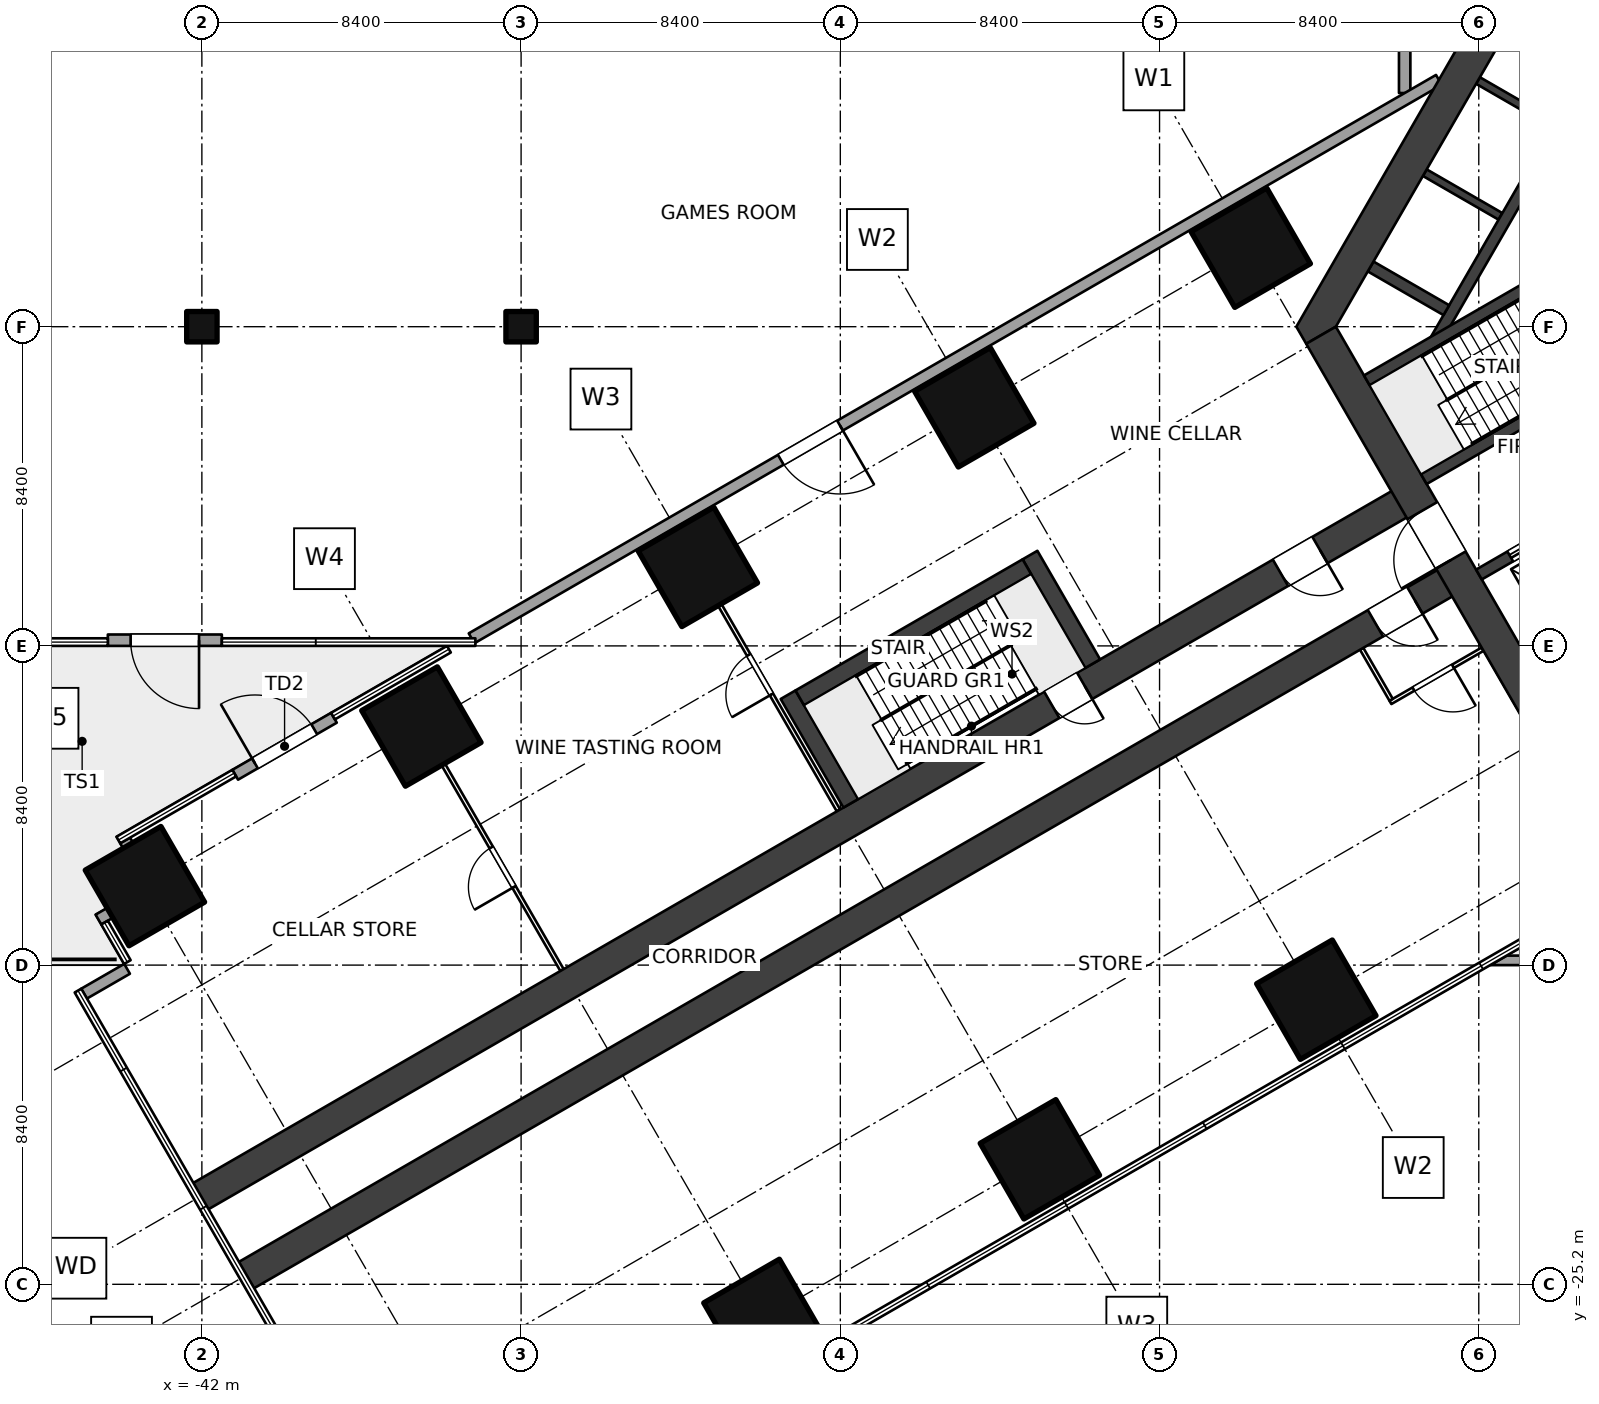
"""IFC4 building model, lengths in metres.
Left out: names, types, materials, properties, quantities, classifications, styles, units other than length and angle.
Written with IfcOpenShell. Run it as: python <this file> out.ifc"""

import sys

from ifc_helpers import new_model, si_unit, direction, frame, frame_2d, origin, origin_2d, place, context, subcontext, project, spatial, polyline, rectangle, outline, extrude, element, fill, save


model = new_model("IFC4")
c1 = context("Model", 3, precision=1e-05, world=origin(), true_north=direction((0.0, 1.0)))
c2 = subcontext(c1, "Body", "Model", "MODEL_VIEW")
j1 = project(units=[si_unit("LENGTHUNIT", "METRE"), si_unit("PLANEANGLEUNIT", "RADIAN")], contexts=[c1])
p1 = place(None, origin())
s1 = spatial("IfcSite", under=j1, at=p1, CompositionType="ELEMENT")
p2 = place(p1, origin())
s2 = spatial("IfcBuilding", under=s1, at=p2, CompositionType="ELEMENT")
p3 = place(p2, frame((0.0, 0.0, 21.0)))
s3 = spatial("IfcBuildingStorey", under=s2, at=p3, CompositionType="ELEMENT", Elevation=21.0)
for number, where, z_axis, x_axis in (
    (1, (-14.4, 2.078, 0.0), (0.0, 0.0, 1.0), (-0.5, 0.866, 0.0)),
    (2, (-12.675, -17.71, 0.0), (0.0, 0.0, 1.0), (-0.5, 0.866, 0.0)),
    (3, (-21.675, -2.122, 0.0), (0.0, 0.0, 1.0), (-0.5, 0.866, 0.0)),
    (4, (-19.949, -21.91, 0.0), (0.0, 0.0, 1.0), (-0.5, 0.866, 0.0)),
    (5, (-28.949, -6.322, 0.0), (0.0, 0.0, 1.0), (-0.5, 0.866, 0.0)),
    (6, (-27.224, -26.11, 0.0), (0.0, 0.0, 1.0), (-0.5, 0.866, 0.0)),
    (7, (-36.224, -10.521, 0.0), (0.0, 0.0, 1.0), (-0.5, 0.866, 0.0)),
    (8, (-43.499, -14.721, 0.0), (0.0, 0.0, 1.0), (-0.5, 0.866, 0.0)),
):
    element("IfcColumn", number, at=place(p3, frame(where, z_axis=z_axis, x_axis=x_axis)), inside=s3, PredefinedType="COLUMN", context=c2, shape_type="SweptSolid", body=[
        extrude(rectangle(XDim=2.3, YDim=2.3, at=origin_2d()), origin(), (0.0, 0.0, 1.0), 5.0),
    ])
for number, where, z_axis, x_axis in (
    (9, (-42.0, 0.0, 0.0), (0.0, 0.0, 1.0), (1.0, 0.0, 0.0)),
    (10, (-33.6, 0.0, 0.0), (0.0, 0.0, 1.0), (1.0, 0.0, 0.0)),
):
    element("IfcColumn", number, at=place(p3, frame(where, z_axis=z_axis, x_axis=x_axis)), inside=s3, PredefinedType="COLUMN", context=c2, shape_type="SweptSolid", body=[
        extrude(rectangle(XDim=0.8, YDim=0.8, at=origin_2d()), origin(), (0.0, 0.0, 1.0), 5.0),
    ])
p4 = place(p3, frame((-6.47, -10.757, 0.0), z_axis=(0.0, 0.0, 1.0), x_axis=(-0.499997612506, 0.8660267822, 0.0)))
e11 = element("IfcWall", 11, at=p4, inside=s3, PredefinedType="SHEAR", context=c2, shape_type="SweptSolid", body=[
    extrude(rectangle(XDim=12.161, YDim=0.9, at=frame_2d((6.08, 0.0))), origin(), (0.0, 0.0, 1.0), 5.0),
])
p5 = place(p4, frame((5.33, 0.0, 0.0)))
e12 = element("IfcOpeningElement", 12, at=p5, cuts=e11, PredefinedType="OPENING", context=c2, shape_type="SweptSolid", body=[
    extrude(rectangle(XDim=1.5, YDim=2.1, at=frame_2d((0.75, 1.05))), frame((0.0, 0.46, 0.0), z_axis=(0.0, -1.0, 0.0), x_axis=(1.0, 0.0, 0.0)), (0.0, 0.0, 1.0), 0.92),
])
p6 = place(p3, origin())
e13 = element("IfcWall", 13, at=p6, inside=s3, PredefinedType="SHEAR", context=c2, shape_type="SweptSolid", body=[
    extrude(outline(polyline([(-6.6, 11.432), (-13.2, 0.0), (-12.94, -0.45), (-12.161, 0.0), (-6.08, 10.531), (-6.08, 11.432), (-6.6, 11.432)])), origin(), (0.0, 0.0, 1.0), 5.0),
])
p7 = place(p3, frame((-3.869, -0.559, 0.0), z_axis=(0.0, 0.0, 1.0), x_axis=(-0.86602711848, -0.499997030048, 0.0)))
e14 = element("IfcWall", 14, at=p7, inside=s3, PredefinedType="SHEAR", context=c2, shape_type="SweptSolid", body=[
    extrude(rectangle(XDim=6.901, YDim=0.3, at=frame_2d((3.451, 0.0))), origin(), (0.0, 0.0, 1.0), 5.0),
])
p8 = place(p7, frame((0.25, 0.0, 0.0)))
e15 = element("IfcOpeningElement", 15, at=p8, cuts=e14, PredefinedType="OPENING", context=c2, shape_type="SweptSolid", body=[
    extrude(rectangle(XDim=1.0, YDim=2.1, at=frame_2d((0.5, 1.05))), frame((0.0, 0.16, 0.0), z_axis=(0.0, -1.0, 0.0), x_axis=(1.0, 0.0, 0.0)), (0.0, 0.0, 1.0), 0.32),
])
p9 = place(p3, frame((-5.369, 2.039, 0.0), z_axis=(0.0, 0.0, 1.0), x_axis=(-0.86602711848, -0.499997030048, 0.0)))
e16 = element("IfcWall", 16, at=p9, inside=s3, PredefinedType="SHEAR", context=c2, shape_type="SweptSolid", body=[
    extrude(rectangle(XDim=6.901, YDim=0.3, at=frame_2d((3.451, 0.0))), origin(), (0.0, 0.0, 1.0), 5.0),
])
p10 = place(p3, frame((-2.419, -3.071, 0.0), z_axis=(0.0, 0.0, 1.0), x_axis=(-0.86602711848, -0.499997030048, 0.0)))
e17 = element("IfcWall", 17, at=p10, inside=s3, PredefinedType="SHEAR", context=c2, shape_type="SweptSolid", body=[
    extrude(rectangle(XDim=6.901, YDim=0.3, at=frame_2d((3.451, 0.0))), origin(), (0.0, 0.0, 1.0), 5.0),
])
p11 = place(p10, frame((4.85, 0.0, 0.0)))
e18 = element("IfcOpeningElement", 18, at=p11, cuts=e17, PredefinedType="OPENING", context=c2, shape_type="SweptSolid", body=[
    extrude(rectangle(XDim=1.1, YDim=2.1, at=frame_2d((0.55, 1.05))), frame((0.0, 0.16, 0.0), z_axis=(0.0, -1.0, 0.0), x_axis=(1.0, 0.0, 0.0)), (0.0, 0.0, 1.0), 0.32),
])
p12 = place(p3, frame((-9.548, -0.374, 0.0), z_axis=(0.0, 0.0, 1.0), x_axis=(0.500002290144, 0.866024081565, 0.0)))
e19 = element("IfcWall", 19, at=p12, inside=s3, PredefinedType="SHEAR", context=c2, shape_type="SweptSolid", body=[
    extrude(rectangle(XDim=10.195, YDim=0.3, at=frame_2d((5.098, 0.0))), origin(), (0.0, 0.0, 1.0), 5.0),
])
p13 = place(p3, frame((-9.254, 0.435, 0.0), z_axis=(0.0, 0.0, 1.0), x_axis=(-0.866007057882, 0.500031774688, 0.0)))
e20 = element("IfcWall", 20, at=p13, inside=s3, PredefinedType="SHEAR", context=c2, shape_type="SweptSolid", body=[
    extrude(rectangle(XDim=2.3, YDim=0.3, at=frame_2d((1.15, 0.0))), origin(), (0.0, 0.0, 1.0), 5.0),
])
for number, where, z_axis, x_axis in (
    (21, (-7.829, 2.903, 0.0), (0.0, 0.0, 1.0), (-0.866, 0.5, 0.0)),
    (22, (-6.429, 5.328, 0.0), (0.0, 0.0, 1.0), (-0.866, 0.5, 0.0)),
):
    element("IfcWall", number, at=place(p3, frame(where, z_axis=z_axis, x_axis=x_axis)), inside=s3, PredefinedType="SHEAR", context=c2, shape_type="SweptSolid", body=[
        extrude(rectangle(XDim=2.3, YDim=0.2, at=frame_2d((1.15, 0.0))), origin(), (0.0, 0.0, 1.0), 5.0),
    ])
p14 = place(p3, frame((-8.91, -6.53, 0.0), z_axis=(0.0, 0.0, 1.0), x_axis=(-0.866026214035, -0.499998596603, 0.0)))
e23 = element("IfcWall", 23, at=p14, inside=s3, PredefinedType="SHEAR", context=c2, shape_type="SweptSolid", body=[
    extrude(rectangle(XDim=36.888, YDim=0.8, at=frame_2d((18.444, 0.0))), origin(), (0.0, 0.0, 1.0), 5.0),
])
p15 = place(p14, frame((1.35, 0.0, 0.0)))
e24 = element("IfcOpeningElement", 24, at=p15, cuts=e23, PredefinedType="OPENING", context=c2, shape_type="SweptSolid", body=[
    extrude(rectangle(XDim=1.2, YDim=2.1, at=frame_2d((0.6, 1.05))), frame((0.0, 0.41, 0.0), z_axis=(0.0, -1.0, 0.0), x_axis=(1.0, 0.0, 0.0)), (0.0, 0.0, 1.0), 0.82),
])
p16 = place(p3, frame((-10.11, -4.451, 0.0), z_axis=(0.0, 0.0, 1.0), x_axis=(-0.866023348156, -0.500003560437, 0.0)))
e25 = element("IfcWall", 25, at=p16, inside=s3, PredefinedType="SHEAR", context=c2, shape_type="SweptSolid", body=[
    extrude(rectangle(XDim=36.888, YDim=0.8, at=frame_2d((18.444, 0.0))), origin(), (0.0, 0.0, 1.0), 5.0),
])
p17 = place(p16, frame((10.0, 0.0, 0.0)))
e26 = element("IfcOpeningElement", 26, at=p17, cuts=e25, PredefinedType="OPENING", context=c2, shape_type="SweptSolid", body=[
    extrude(rectangle(XDim=1.0, YDim=2.1, at=frame_2d((0.5, 1.05))), frame((0.0, 0.41, 0.0), z_axis=(0.0, -1.0, 0.0), x_axis=(1.0, 0.0, 0.0)), (0.0, 0.0, 1.0), 0.82),
])
p18 = place(p16, frame((2.85, 0.0, 0.0)))
e27 = element("IfcOpeningElement", 27, at=p18, cuts=e25, PredefinedType="OPENING", context=c2, shape_type="SweptSolid", body=[
    extrude(rectangle(XDim=1.2, YDim=2.1, at=frame_2d((0.6, 1.05))), frame((0.0, 0.41, 0.0), z_axis=(0.0, -1.0, 0.0), x_axis=(1.0, 0.0, 0.0)), (0.0, 0.0, 1.0), 0.82),
])
p19 = place(p3, frame((-45.103, -17.553, 0.0), z_axis=(0.0, 0.0, 1.0), x_axis=(0.865974499684, 0.500088158126, 0.0)))
e28 = element("IfcWall", 28, at=p19, inside=s3, PredefinedType="SOLIDWALL", context=c2, shape_type="SweptSolid", body=[
    extrude(rectangle(XDim=1.31, YDim=0.3, at=frame_2d((0.655, 0.0))), origin(), (0.0, 0.0, 1.0), 4.6),
])
p20 = place(p3, frame((-44.722, -15.602, 0.0), z_axis=(0.0, 0.0, 1.0), x_axis=(0.865939549016, 0.500148675346, 0.0)))
e29 = element("IfcWall", 29, at=p20, inside=s3, PredefinedType="SOLIDWALL", context=c2, shape_type="SweptSolid", body=[
    extrude(rectangle(XDim=0.347, YDim=0.3, at=frame_2d((0.174, 0.0))), origin(), (0.0, 0.0, 1.0), 4.6),
])
p21 = place(p3, frame((-43.519, -14.387, 0.0), z_axis=(0.0, 0.0, 1.0), x_axis=(-0.499953773667, 0.866052090925, 0.0)))
e30 = element("IfcWall", 30, at=p21, inside=s3, PredefinedType="SOLIDWALL", context=c2, shape_type="SweptSolid", body=[
    extrude(rectangle(XDim=1.005, YDim=0.3, at=frame_2d((0.502, 0.0))), origin(), (0.0, 0.0, 1.0), 4.6),
])
p22 = place(p3, frame((-41.123, -11.791, 0.0), z_axis=(0.0, 0.0, 1.0), x_axis=(0.866010750942, 0.50002537861, 0.0)))
e31 = element("IfcWall", 31, at=p22, inside=s3, PredefinedType="SOLIDWALL", context=c2, shape_type="SweptSolid", body=[
    extrude(rectangle(XDim=3.0, YDim=0.3, at=frame_2d((1.5, 0.0))), origin(), (0.0, 0.0, 1.0), 4.6),
])
p23 = place(p22, frame((0.6, 0.0, 0.0)))
e32 = element("IfcOpeningElement", 32, at=p23, cuts=e31, PredefinedType="OPENING", context=c2, shape_type="SweptSolid", body=[
    extrude(rectangle(XDim=1.8, YDim=2.4, at=frame_2d((0.9, 1.2))), frame((0.0, 0.16, 0.0), z_axis=(0.0, -1.0, 0.0), x_axis=(1.0, 0.0, 0.0)), (0.0, 0.0, 1.0), 0.32),
])
p24 = place(p3, frame((-41.475, -8.25, 0.0), z_axis=(0.0, 0.0, 1.0), x_axis=(-1.0, 0.0, 0.0)))
e33 = element("IfcWall", 33, at=p24, inside=s3, PredefinedType="SOLIDWALL", context=c2, shape_type="SweptSolid", body=[
    extrude(rectangle(XDim=3.0, YDim=0.3, at=frame_2d((1.5, 0.0))), origin(), (0.0, 0.0, 1.0), 4.6),
])
p25 = place(p24, frame((0.6, 0.0, 0.0)))
e34 = element("IfcOpeningElement", 34, at=p25, cuts=e33, PredefinedType="OPENING", context=c2, shape_type="SweptSolid", body=[
    extrude(rectangle(XDim=1.8, YDim=2.4, at=frame_2d((0.9, 1.2))), frame((0.0, 0.16, 0.0), z_axis=(0.0, -1.0, 0.0), x_axis=(1.0, 0.0, 0.0)), (0.0, 0.0, 1.0), 0.32),
])
p26 = place(p3, origin())
e35 = element("IfcWall", 35, at=p26, inside=s3, PredefinedType="PARAPET", context=c2, shape_type="SweptSolid", body=[
    extrude(outline(polyline([(8.096, -16.8), (-8.096, -16.8), (-7.663, -16.55), (7.663, -16.55), (8.096, -16.8)])), origin(), (0.0, 0.0, 1.0), 1.1),
])
p27 = place(p3, frame((-8.3, -8.487, 0.0), z_axis=(0.0, 0.0, 1.0), x_axis=(-0.866034573852, -0.49998411664, 0.0)))
e36 = element("IfcWall", 36, at=p27, inside=s3, PredefinedType="PARTITIONING", context=c2, shape_type="SweptSolid", body=[
    extrude(rectangle(XDim=2.8, YDim=0.1, at=frame_2d((1.4, 0.0))), origin(), (0.0, 0.0, 1.0), 4.6),
])
p28 = place(p27, frame((0.9, 0.0, 0.0)))
e37 = element("IfcOpeningElement", 37, at=p28, cuts=e36, PredefinedType="OPENING", context=c2, shape_type="SweptSolid", body=[
    extrude(rectangle(XDim=1.2, YDim=2.1, at=frame_2d((0.6, 1.05))), frame((0.0, 0.06, 0.0), z_axis=(0.0, -1.0, 0.0), x_axis=(1.0, 0.0, 0.0)), (0.0, 0.0, 1.0), 0.12),
])
p29 = place(p3, frame((-11.482, -8.476, 0.0), z_axis=(0.0, 0.0, 1.0), x_axis=(0.500017819788, -0.86601511528, 0.0)))
e38 = element("IfcWall", 38, at=p29, inside=s3, PredefinedType="PARTITIONING", context=c2, shape_type="SweptSolid", body=[
    extrude(rectangle(XDim=1.55, YDim=0.1, at=frame_2d((0.775, 0.0))), origin(), (0.0, 0.0, 1.0), 4.6),
])
p30 = place(p3, frame((-25.249, -12.73, 0.0), z_axis=(0.0, 0.0, 1.0), x_axis=(-0.499987320047, 0.866032724435, 0.0)))
e39 = element("IfcWall", 39, at=p30, inside=s3, PredefinedType="PARTITIONING", context=c2, shape_type="SweptSolid", body=[
    extrude(rectangle(XDim=6.25, YDim=0.1, at=frame_2d((3.125, 0.0))), origin(), (0.0, 0.0, 1.0), 2.8),
])
p31 = place(p30, frame((3.525, 0.0, 0.0)))
e40 = element("IfcOpeningElement", 40, at=p31, cuts=e39, PredefinedType="OPENING", context=c2, shape_type="SweptSolid", body=[
    extrude(rectangle(XDim=1.2, YDim=2.1, at=frame_2d((0.6, 1.05))), frame((0.0, 0.06, 0.0), z_axis=(0.0, -1.0, 0.0), x_axis=(1.0, 0.0, 0.0)), (0.0, 0.0, 1.0), 0.12),
])
p32 = place(p3, frame((-32.524, -16.93, 0.0), z_axis=(0.0, 0.0, 1.0), x_axis=(-0.500004234368, 0.866022959057, 0.0)))
e41 = element("IfcWall", 41, at=p32, inside=s3, PredefinedType="PARTITIONING", context=c2, shape_type="SweptSolid", body=[
    extrude(rectangle(XDim=6.25, YDim=0.1, at=frame_2d((3.125, 0.0))), origin(), (0.0, 0.0, 1.0), 2.8),
])
p33 = place(p32, frame((2.525, 0.0, 0.0)))
e42 = element("IfcOpeningElement", 42, at=p33, cuts=e41, PredefinedType="OPENING", context=c2, shape_type="SweptSolid", body=[
    extrude(rectangle(XDim=1.2, YDim=2.1, at=frame_2d((0.6, 1.05))), frame((0.0, 0.06, 0.0), z_axis=(0.0, -1.0, 0.0), x_axis=(1.0, 0.0, 0.0)), (0.0, 0.0, 1.0), 0.12),
])
p34 = place(p3, frame((-10.35, 6.149, 0.0), z_axis=(0.0, 0.0, 1.0), x_axis=(0.0, 1.0, 0.0)))
e43 = element("IfcWall", 43, at=p34, inside=s3, PredefinedType="SOLIDWALL", context=c2, shape_type="SweptSolid", body=[
    extrude(rectangle(XDim=41.883, YDim=0.3, at=frame_2d((20.941, 0.0))), origin(), (0.0, 0.0, 1.0), 4.6),
])
p35 = place(p34, frame((25.383, 0.0, 0.0)))
e44 = element("IfcOpeningElement", 44, at=p35, cuts=e43, PredefinedType="OPENING", context=c2, shape_type="SweptSolid", body=[
    extrude(rectangle(XDim=1.8, YDim=2.4, at=frame_2d((0.9, 1.2))), frame((0.0, 0.16, 0.0), z_axis=(0.0, -1.0, 0.0), x_axis=(1.0, 0.0, 0.0)), (0.0, 0.0, 1.0), 0.32),
])
p36 = place(p3, frame((-9.45, 6.495, 0.0), z_axis=(0.0, 0.0, 1.0), x_axis=(-0.866027750123, -0.499995936, 0.0)))
e45 = element("IfcWall", 45, at=p36, inside=s3, PredefinedType="SOLIDWALL", context=c2, shape_type="SweptSolid", body=[
    extrude(rectangle(XDim=29.39, YDim=0.3, at=frame_2d((14.695, 0.0))), origin(), (0.0, 0.0, 1.0), 4.6),
])
p37 = place(p36, frame((18.195, 0.0, 0.0)))
e46 = element("IfcOpeningElement", 46, at=p37, cuts=e45, PredefinedType="OPENING", context=c2, shape_type="SweptSolid", body=[
    extrude(rectangle(XDim=1.8, YDim=2.4, at=frame_2d((0.9, 1.2))), frame((0.0, 0.16, 0.0), z_axis=(0.0, -1.0, 0.0), x_axis=(1.0, 0.0, 0.0)), (0.0, 0.0, 1.0), 0.32),
])
for number, where, z_axis, x_axis in (
    (47, (-18.559, -8.868, 0.0), (0.0, 0.0, 1.0), (-0.5, 0.866, 0.0)),
    (48, (-24.925, -12.543, 0.0), (0.0, 0.0, 1.0), (-0.5, 0.866, 0.0)),
):
    element("IfcWall", number, at=place(p3, frame(where, z_axis=z_axis, x_axis=x_axis)), inside=s3, PredefinedType="SOLIDWALL", context=c2, shape_type="SweptSolid", body=[
        extrude(rectangle(XDim=3.3, YDim=0.45, at=frame_2d((1.65, 0.0))), origin(), (0.0, 0.0, 1.0), 5.0),
    ])
p38 = place(p3, frame((-20.292, -6.317, 0.0), z_axis=(0.0, 0.0, 1.0), x_axis=(-0.866028853923, -0.499994024137, 0.0)))
e49 = element("IfcWall", 49, at=p38, inside=s3, PredefinedType="SOLIDWALL", context=c2, shape_type="SweptSolid", body=[
    extrude(rectangle(XDim=6.9, YDim=0.45, at=frame_2d((3.45, 0.0))), origin(), (0.0, 0.0, 1.0), 5.0),
])
p39 = place(p23, origin())
e50 = element("IfcDoor", 50, at=p39, inside=s3, OperationType="DOUBLE_DOOR_SINGLE_SWING", PredefinedType="DOOR", context=c2, shape_type="SweptSolid", body=[
    extrude(rectangle(XDim=1.8, YDim=2.4, at=frame_2d((0.9, 1.2))), frame((0.0, 0.025, 0.0), z_axis=(0.0, -1.0, 0.0), x_axis=(1.0, 0.0, 0.0)), (0.0, 0.0, 1.0), 0.05),
])
fill(e32, e50)
p40 = place(p25, origin())
e51 = element("IfcDoor", 51, at=p40, inside=s3, OperationType="DOUBLE_DOOR_SINGLE_SWING", PredefinedType="DOOR", context=c2, shape_type="SweptSolid", body=[
    extrude(rectangle(XDim=1.8, YDim=2.4, at=frame_2d((0.9, 1.2))), frame((0.0, 0.025, 0.0), z_axis=(0.0, -1.0, 0.0), x_axis=(1.0, 0.0, 0.0)), (0.0, 0.0, 1.0), 0.05),
])
fill(e34, e51)
p41 = place(p11, origin())
e52 = element("IfcDoor", 52, at=p41, inside=s3, OperationType="DOUBLE_DOOR_SLIDING", PredefinedType="DOOR", context=c2, shape_type="SweptSolid", body=[
    extrude(rectangle(XDim=1.1, YDim=2.1, at=frame_2d((0.55, 1.05))), frame((0.0, 0.025, 0.0), z_axis=(0.0, -1.0, 0.0), x_axis=(1.0, 0.0, 0.0)), (0.0, 0.0, 1.0), 0.05),
])
fill(e18, e52)
p42 = place(p5, origin())
e53 = element("IfcDoor", 53, at=p42, inside=s3, OperationType="DOUBLE_DOOR_DOUBLE_SWING", PredefinedType="DOOR", context=c2, shape_type="SweptSolid", body=[
    extrude(rectangle(XDim=1.5, YDim=2.1, at=frame_2d((0.75, 1.05))), frame((0.0, 0.025, 0.0), z_axis=(0.0, -1.0, 0.0), x_axis=(1.0, 0.0, 0.0)), (0.0, 0.0, 1.0), 0.05),
])
fill(e12, e53)
p43 = place(p17, origin())
e54 = element("IfcDoor", 54, at=p43, inside=s3, OperationType="SINGLE_SWING_LEFT", PredefinedType="DOOR", context=c2, shape_type="SweptSolid", body=[
    extrude(rectangle(XDim=1.0, YDim=2.1, at=frame_2d((0.5, 1.05))), frame((0.0, 0.025, 0.0), z_axis=(0.0, -1.0, 0.0), x_axis=(1.0, 0.0, 0.0)), (0.0, 0.0, 1.0), 0.05),
])
fill(e26, e54)
p44 = place(p15, origin())
e55 = element("IfcDoor", 55, at=p44, inside=s3, OperationType="DOUBLE_SWING_LEFT", PredefinedType="DOOR", context=c2, shape_type="SweptSolid", body=[
    extrude(rectangle(XDim=1.2, YDim=2.1, at=frame_2d((0.6, 1.05))), frame((0.0, 0.025, 0.0), z_axis=(0.0, -1.0, 0.0), x_axis=(1.0, 0.0, 0.0)), (0.0, 0.0, 1.0), 0.05),
])
fill(e24, e55)
p45 = place(p28, origin())
e56 = element("IfcDoor", 56, at=p45, inside=s3, OperationType="DOUBLE_SWING_LEFT", PredefinedType="DOOR", context=c2, shape_type="SweptSolid", body=[
    extrude(rectangle(XDim=1.2, YDim=2.1, at=frame_2d((0.6, 1.05))), frame((0.0, 0.025, 0.0), z_axis=(0.0, -1.0, 0.0), x_axis=(1.0, 0.0, 0.0)), (0.0, 0.0, 1.0), 0.05),
])
fill(e37, e56)
p46 = place(p31, origin())
e57 = element("IfcDoor", 57, at=p46, inside=s3, OperationType="DOUBLE_SWING_LEFT", PredefinedType="DOOR", context=c2, shape_type="SweptSolid", body=[
    extrude(rectangle(XDim=1.2, YDim=2.1, at=frame_2d((0.6, 1.05))), frame((0.0, 0.025, 0.0), z_axis=(0.0, -1.0, 0.0), x_axis=(1.0, 0.0, 0.0)), (0.0, 0.0, 1.0), 0.05),
])
fill(e40, e57)
p47 = place(p33, origin())
e58 = element("IfcDoor", 58, at=p47, inside=s3, OperationType="DOUBLE_SWING_LEFT", PredefinedType="DOOR", context=c2, shape_type="SweptSolid", body=[
    extrude(rectangle(XDim=1.2, YDim=2.1, at=frame_2d((0.6, 1.05))), frame((0.0, 0.025, 0.0), z_axis=(0.0, -1.0, 0.0), x_axis=(1.0, 0.0, 0.0)), (0.0, 0.0, 1.0), 0.05),
])
fill(e42, e58)
p48 = place(p18, origin())
e59 = element("IfcDoor", 59, at=p48, inside=s3, OperationType="DOUBLE_SWING_LEFT", PredefinedType="DOOR", context=c2, shape_type="SweptSolid", body=[
    extrude(rectangle(XDim=1.2, YDim=2.1, at=frame_2d((0.6, 1.05))), frame((0.0, 0.025, 0.0), z_axis=(0.0, -1.0, 0.0), x_axis=(1.0, 0.0, 0.0)), (0.0, 0.0, 1.0), 0.05),
])
fill(e27, e59)
p49 = place(p37, origin())
e60 = element("IfcDoor", 60, at=p49, inside=s3, OperationType="DOUBLE_DOOR_DOUBLE_SWING", PredefinedType="DOOR", context=c2, shape_type="SweptSolid", body=[
    extrude(rectangle(XDim=1.8, YDim=2.4, at=frame_2d((0.9, 1.2))), frame((0.0, 0.025, 0.0), z_axis=(0.0, -1.0, 0.0), x_axis=(1.0, 0.0, 0.0)), (0.0, 0.0, 1.0), 0.05),
])
fill(e46, e60)
save(model, sys.argv[1])
